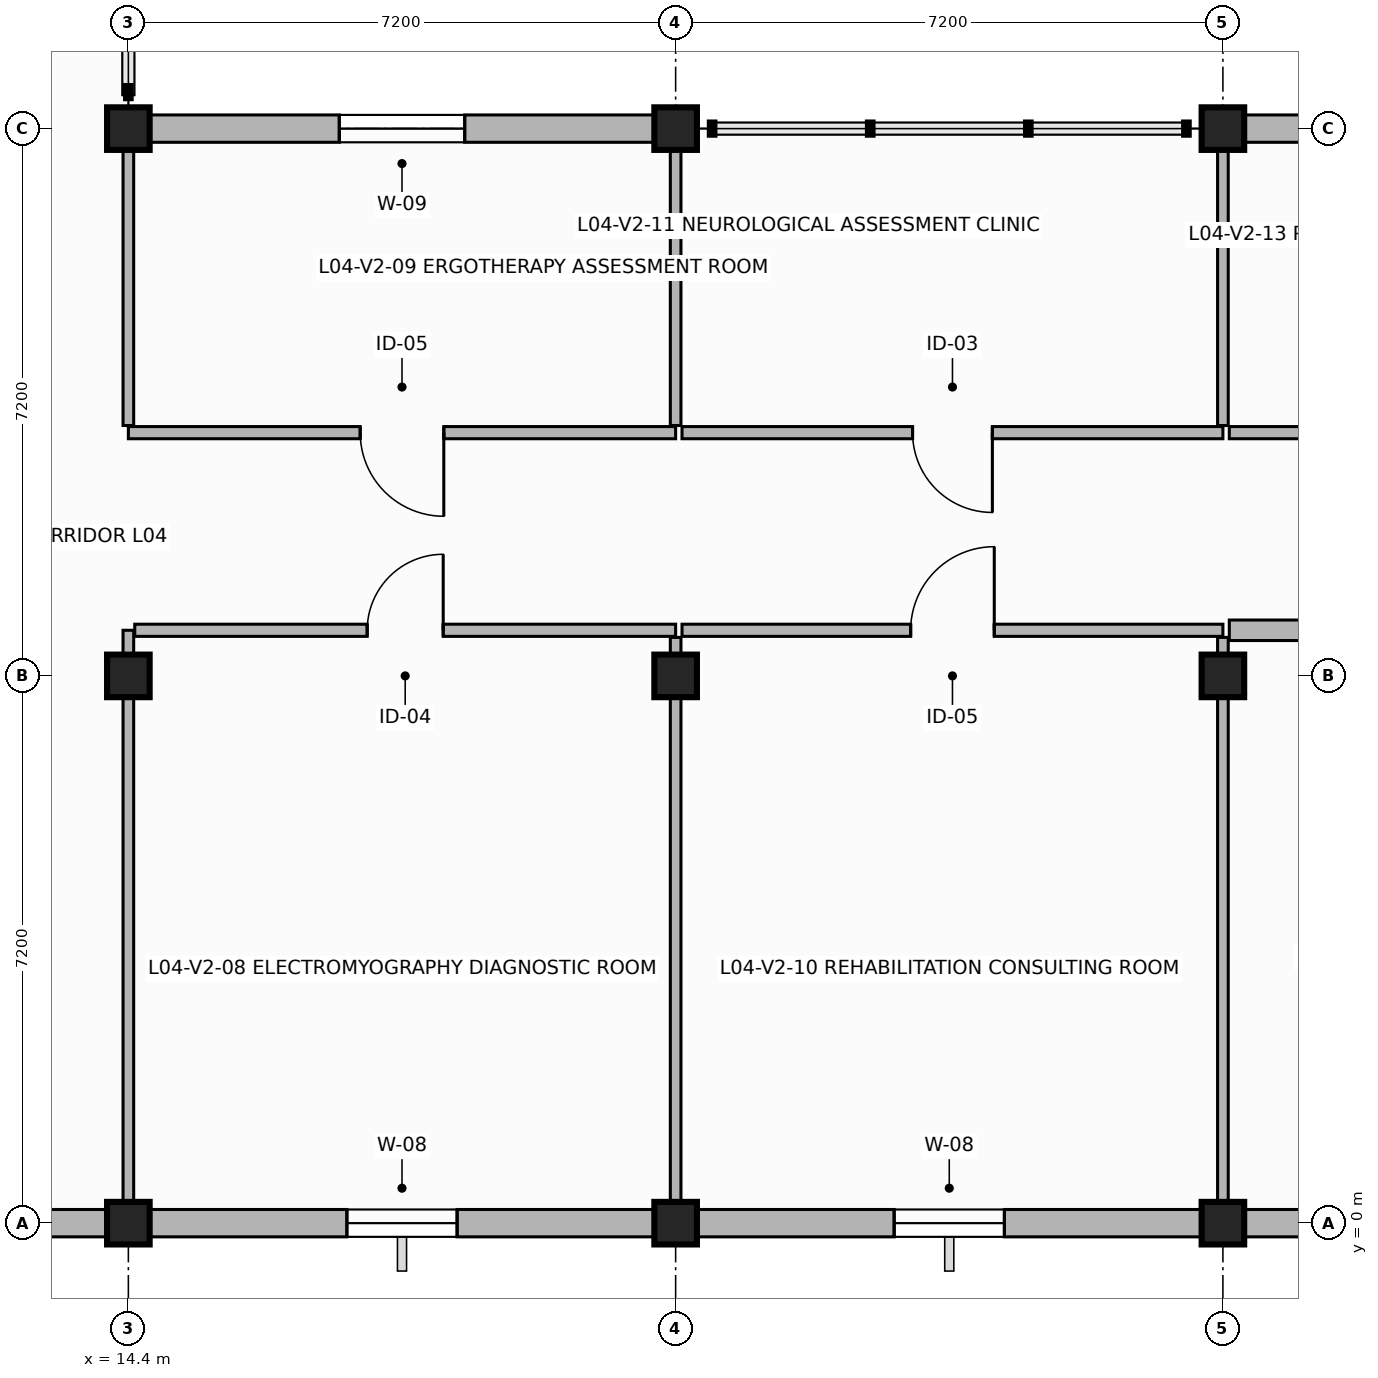
"""IFC4 building model, lengths in metres.
Left out: names, types, materials, properties, quantities, classifications, styles, units other than length and angle.
Written with IfcOpenShell. Run it as: python <this file> out.ifc"""

import sys

from ifc_helpers import new_model, si_unit, direction, frame, frame_2d, origin, origin_2d, place, context, subcontext, project, spatial, rectangle, extrude, element, fill, save


model = new_model("IFC4")
c1 = context("Model", 3, precision=1e-05, world=origin(), true_north=direction((0.0, 1.0)))
c2 = subcontext(c1, "Body", "Model", "MODEL_VIEW")
j1 = project(units=[si_unit("LENGTHUNIT", "METRE"), si_unit("PLANEANGLEUNIT", "RADIAN")], contexts=[c1])
p1 = place(None, origin())
s1 = spatial("IfcSite", under=j1, at=p1, CompositionType="ELEMENT")
p2 = place(p1, origin())
s2 = spatial("IfcBuilding", under=s1, at=p2, CompositionType="ELEMENT")
p3 = place(p2, frame((0.0, 0.0, 16.0)))
s3 = spatial("IfcBuildingStorey", under=s2, at=p3, CompositionType="ELEMENT", Elevation=16.0)
for number, where, z_axis, x_axis in (
    (1, (14.4, 0.0, 0.0), (0.0, 0.0, 1.0), (1.0, 0.0, 0.0)),
    (2, (14.4, 7.2, 0.0), (0.0, 0.0, 1.0), (1.0, 0.0, 0.0)),
    (3, (14.4, 14.4, 0.0), (0.0, 0.0, 1.0), (1.0, 0.0, 0.0)),
    (4, (21.6, 0.0, 0.0), (0.0, 0.0, 1.0), (1.0, 0.0, 0.0)),
    (5, (21.6, 7.2, 0.0), (0.0, 0.0, 1.0), (1.0, 0.0, 0.0)),
    (6, (21.6, 14.4, 0.0), (0.0, 0.0, 1.0), (1.0, 0.0, 0.0)),
    (7, (28.8, 0.0, 0.0), (0.0, 0.0, 1.0), (1.0, 0.0, 0.0)),
    (8, (28.8, 7.2, 0.0), (0.0, 0.0, 1.0), (1.0, 0.0, 0.0)),
    (9, (28.8, 14.4, 0.0), (0.0, 0.0, 1.0), (1.0, 0.0, 0.0)),
):
    element("IfcColumn", number, at=place(p3, frame(where, z_axis=z_axis, x_axis=x_axis)), inside=s3, PredefinedType="COLUMN", context=c2, shape_type="SweptSolid", body=[
        extrude(rectangle(XDim=0.56, YDim=0.56, at=origin_2d()), origin(), (0.0, 0.0, 1.0), 3.42),
    ])
p4 = place(p3, frame((7.2, 0.0, 0.0), z_axis=(0.0, 0.0, 1.0), x_axis=(1.0, 0.0, 0.0)))
e10 = element("IfcWall", 10, at=p4, inside=s3, PredefinedType="SOLIDWALL", context=c2, shape_type="SweptSolid", body=[
    extrude(rectangle(XDim=7.2, YDim=0.36, at=frame_2d((3.6, 0.0))), origin(), (0.0, 0.0, 1.0), 2.8),
])
p5 = place(p4, frame((2.875, 0.0, 0.85)))
e11 = element("IfcOpeningElement", 11, at=p5, cuts=e10, PredefinedType="OPENING", context=c2, shape_type="SweptSolid", body=[
    extrude(rectangle(XDim=1.45, YDim=1.75, at=frame_2d((0.725, 0.875))), frame((0.0, 0.19, 0.0), z_axis=(0.0, -1.0, 0.0), x_axis=(1.0, 0.0, 0.0)), (0.0, 0.0, 1.0), 0.38),
])
p6 = place(p3, frame((14.4, 0.0, 0.0), z_axis=(0.0, 0.0, 1.0), x_axis=(1.0, 0.0, 0.0)))
e12 = element("IfcWall", 12, at=p6, inside=s3, PredefinedType="SOLIDWALL", context=c2, shape_type="SweptSolid", body=[
    extrude(rectangle(XDim=7.2, YDim=0.36, at=frame_2d((3.6, 0.0))), origin(), (0.0, 0.0, 1.0), 2.8),
])
p7 = place(p6, frame((2.875, 0.0, 0.85)))
e13 = element("IfcOpeningElement", 13, at=p7, cuts=e12, PredefinedType="OPENING", context=c2, shape_type="SweptSolid", body=[
    extrude(rectangle(XDim=1.45, YDim=1.75, at=frame_2d((0.725, 0.875))), frame((0.0, 0.19, 0.0), z_axis=(0.0, -1.0, 0.0), x_axis=(1.0, 0.0, 0.0)), (0.0, 0.0, 1.0), 0.38),
])
p8 = place(p3, frame((21.6, 0.0, 0.0), z_axis=(0.0, 0.0, 1.0), x_axis=(1.0, 0.0, 0.0)))
e14 = element("IfcWall", 14, at=p8, inside=s3, PredefinedType="SOLIDWALL", context=c2, shape_type="SweptSolid", body=[
    extrude(rectangle(XDim=7.2, YDim=0.36, at=frame_2d((3.6, 0.0))), origin(), (0.0, 0.0, 1.0), 2.8),
])
p9 = place(p8, frame((2.875, 0.0, 0.85)))
e15 = element("IfcOpeningElement", 15, at=p9, cuts=e14, PredefinedType="OPENING", context=c2, shape_type="SweptSolid", body=[
    extrude(rectangle(XDim=1.45, YDim=1.75, at=frame_2d((0.725, 0.875))), frame((0.0, 0.19, 0.0), z_axis=(0.0, -1.0, 0.0), x_axis=(1.0, 0.0, 0.0)), (0.0, 0.0, 1.0), 0.38),
])
p10 = place(p3, frame((28.8, 0.0, 0.0), z_axis=(0.0, 0.0, 1.0), x_axis=(1.0, 0.0, 0.0)))
e16 = element("IfcWall", 16, at=p10, inside=s3, PredefinedType="SOLIDWALL", context=c2, shape_type="SweptSolid", body=[
    extrude(rectangle(XDim=4.8, YDim=0.36, at=frame_2d((2.4, 0.0))), origin(), (0.0, 0.0, 1.0), 2.8),
])
p11 = place(p10, frame((1.875, 0.0, 0.85)))
e17 = element("IfcOpeningElement", 17, at=p11, cuts=e16, PredefinedType="OPENING", context=c2, shape_type="SweptSolid", body=[
    extrude(rectangle(XDim=1.05, YDim=1.7, at=frame_2d((0.525, 0.85))), frame((0.0, 0.19, 0.0), z_axis=(0.0, -1.0, 0.0), x_axis=(1.0, 0.0, 0.0)), (0.0, 0.0, 1.0), 0.38),
])
p12 = place(p3, frame((33.6, 14.4, 0.0), z_axis=(0.0, 0.0, 1.0), x_axis=(-1.0, 0.0, 0.0)))
e18 = element("IfcWall", 18, at=p12, inside=s3, PredefinedType="SOLIDWALL", context=c2, shape_type="SweptSolid", body=[
    extrude(rectangle(XDim=4.8, YDim=0.36, at=frame_2d((2.4, 0.0))), origin(), (0.0, 0.0, 1.0), 2.8),
])
p13 = place(p12, frame((1.875, 0.0, 0.85)))
e19 = element("IfcOpeningElement", 19, at=p13, cuts=e18, PredefinedType="OPENING", context=c2, shape_type="SweptSolid", body=[
    extrude(rectangle(XDim=1.05, YDim=1.7, at=frame_2d((0.525, 0.85))), frame((0.0, 0.19, 0.0), z_axis=(0.0, -1.0, 0.0), x_axis=(1.0, 0.0, 0.0)), (0.0, 0.0, 1.0), 0.38),
])
p14 = place(p3, frame((21.6, 14.4, 0.0), z_axis=(0.0, 0.0, 1.0), x_axis=(-1.0, 0.0, 0.0)))
e20 = element("IfcWall", 20, at=p14, inside=s3, PredefinedType="SOLIDWALL", context=c2, shape_type="SweptSolid", body=[
    extrude(rectangle(XDim=7.2, YDim=0.36, at=frame_2d((3.6, 0.0))), origin(), (0.0, 0.0, 1.0), 2.8),
])
p15 = place(p14, frame((2.775, 0.0, 0.85)))
e21 = element("IfcOpeningElement", 21, at=p15, cuts=e20, PredefinedType="OPENING", context=c2, shape_type="SweptSolid", body=[
    extrude(rectangle(XDim=1.65, YDim=1.75, at=frame_2d((0.825, 0.875))), frame((0.0, 0.19, 0.0), z_axis=(0.0, -1.0, 0.0), x_axis=(1.0, 0.0, 0.0)), (0.0, 0.0, 1.0), 0.38),
])
p16 = place(p3, frame((14.4, 0.195, 0.0), z_axis=(0.0, 0.0, 1.0), x_axis=(0.0, 1.0, 0.0)))
e22 = element("IfcWall", 22, at=p16, inside=s3, PredefinedType="PARTITIONING", context=c2, shape_type="SweptSolid", body=[
    extrude(rectangle(XDim=7.605, YDim=0.14, at=frame_2d((3.802, 0.0))), origin(), (0.0, 0.0, 1.0), 2.78),
])
p17 = place(p3, frame((14.484, 7.8, 0.0), z_axis=(0.0, 0.0, 1.0), x_axis=(1.0, 0.0, 0.0)))
e23 = element("IfcWall", 23, at=p17, inside=s3, PredefinedType="PARTITIONING", context=c2, shape_type="SweptSolid", body=[
    extrude(rectangle(XDim=7.116, YDim=0.16, at=frame_2d((3.558, 0.0))), origin(), (0.0, 0.0, 1.0), 2.78),
])
p18 = place(p17, frame((3.058, 0.0, 0.0)))
e24 = element("IfcOpeningElement", 24, at=p18, cuts=e23, PredefinedType="OPENING", context=c2, shape_type="SweptSolid", body=[
    extrude(rectangle(XDim=1.0, YDim=2.15, at=frame_2d((0.5, 1.075))), frame((0.0, 0.09, 0.0), z_axis=(0.0, -1.0, 0.0), x_axis=(1.0, 0.0, 0.0)), (0.0, 0.0, 1.0), 0.18),
])
p19 = place(p3, frame((21.6, 7.706, 0.0), z_axis=(0.0, 0.0, 1.0), x_axis=(0.0, -1.0, 0.0)))
e25 = element("IfcWall", 25, at=p19, inside=s3, PredefinedType="PARTITIONING", context=c2, shape_type="SweptSolid", body=[
    extrude(rectangle(XDim=7.511, YDim=0.14, at=frame_2d((3.755, 0.0))), origin(), (0.0, 0.0, 1.0), 2.78),
])
p20 = place(p3, frame((21.6, 10.4, 0.0), z_axis=(0.0, 0.0, 1.0), x_axis=(-1.0, 0.0, 0.0)))
e26 = element("IfcWall", 26, at=p20, inside=s3, PredefinedType="PARTITIONING", context=c2, shape_type="SweptSolid", body=[
    extrude(rectangle(XDim=7.2, YDim=0.16, at=frame_2d((3.6, 0.0))), origin(), (0.0, 0.0, 1.0), 2.78),
])
p21 = place(p20, frame((3.05, 0.0, 0.0)))
e27 = element("IfcOpeningElement", 27, at=p21, cuts=e26, PredefinedType="OPENING", context=c2, shape_type="SweptSolid", body=[
    extrude(rectangle(XDim=1.1, YDim=2.2, at=frame_2d((0.55, 1.1))), frame((0.0, 0.09, 0.0), z_axis=(0.0, -1.0, 0.0), x_axis=(1.0, 0.0, 0.0)), (0.0, 0.0, 1.0), 0.18),
])
for number, where, z_axis, x_axis in (
    (28, (14.4, 10.494, 0.0), (0.0, 0.0, 1.0), (0.0, 1.0, 0.0)),
    (29, (21.6, 14.205, 0.0), (0.0, 0.0, 1.0), (0.0, -1.0, 0.0)),
):
    element("IfcWall", number, at=place(p3, frame(where, z_axis=z_axis, x_axis=x_axis)), inside=s3, PredefinedType="PARTITIONING", context=c2, shape_type="SweptSolid", body=[
        extrude(rectangle(XDim=3.711, YDim=0.14, at=frame_2d((1.855, 0.0))), origin(), (0.0, 0.0, 1.0), 2.78),
    ])
p22 = place(p3, frame((21.684, 7.8, 0.0), z_axis=(0.0, 0.0, 1.0), x_axis=(1.0, 0.0, 0.0)))
e30 = element("IfcWall", 30, at=p22, inside=s3, PredefinedType="PARTITIONING", context=c2, shape_type="SweptSolid", body=[
    extrude(rectangle(XDim=7.116, YDim=0.16, at=frame_2d((3.558, 0.0))), origin(), (0.0, 0.0, 1.0), 2.78),
])
p23 = place(p22, frame((3.008, 0.0, 0.0)))
e31 = element("IfcOpeningElement", 31, at=p23, cuts=e30, PredefinedType="OPENING", context=c2, shape_type="SweptSolid", body=[
    extrude(rectangle(XDim=1.1, YDim=2.2, at=frame_2d((0.55, 1.1))), frame((0.0, 0.09, 0.0), z_axis=(0.0, -1.0, 0.0), x_axis=(1.0, 0.0, 0.0)), (0.0, 0.0, 1.0), 0.18),
])
p24 = place(p3, frame((28.8, 7.706, 0.0), z_axis=(0.0, 0.0, 1.0), x_axis=(0.0, -1.0, 0.0)))
e32 = element("IfcWall", 32, at=p24, inside=s3, PredefinedType="PARTITIONING", context=c2, shape_type="SweptSolid", body=[
    extrude(rectangle(XDim=7.511, YDim=0.14, at=frame_2d((3.755, 0.0))), origin(), (0.0, 0.0, 1.0), 2.78),
])
p25 = place(p3, frame((28.8, 10.4, 0.0), z_axis=(0.0, 0.0, 1.0), x_axis=(-1.0, 0.0, 0.0)))
e33 = element("IfcWall", 33, at=p25, inside=s3, PredefinedType="PARTITIONING", context=c2, shape_type="SweptSolid", body=[
    extrude(rectangle(XDim=7.116, YDim=0.16, at=frame_2d((3.558, 0.0))), origin(), (0.0, 0.0, 1.0), 2.78),
])
p26 = place(p25, frame((3.033, 0.0, 0.0)))
e34 = element("IfcOpeningElement", 34, at=p26, cuts=e33, PredefinedType="OPENING", context=c2, shape_type="SweptSolid", body=[
    extrude(rectangle(XDim=1.05, YDim=2.15, at=frame_2d((0.525, 1.075))), frame((0.0, 0.09, 0.0), z_axis=(0.0, -1.0, 0.0), x_axis=(1.0, 0.0, 0.0)), (0.0, 0.0, 1.0), 0.18),
])
p27 = place(p3, frame((28.8, 14.205, 0.0), z_axis=(0.0, 0.0, 1.0), x_axis=(0.0, -1.0, 0.0)))
e35 = element("IfcWall", 35, at=p27, inside=s3, PredefinedType="PARTITIONING", context=c2, shape_type="SweptSolid", body=[
    extrude(rectangle(XDim=3.711, YDim=0.14, at=frame_2d((1.855, 0.0))), origin(), (0.0, 0.0, 1.0), 2.78),
])
p28 = place(p3, frame((28.884, 7.8, 0.0), z_axis=(0.0, 0.0, 1.0), x_axis=(1.0, 0.0, 0.0)))
e36 = element("IfcWall", 36, at=p28, inside=s3, PredefinedType="PARTITIONING", context=c2, shape_type="SweptSolid", body=[
    extrude(rectangle(XDim=4.716, YDim=0.27, at=frame_2d((2.358, 0.0))), origin(), (0.0, 0.0, 1.0), 2.78),
])
p29 = place(p28, frame((1.858, 0.0, 0.0)))
e37 = element("IfcOpeningElement", 37, at=p29, cuts=e36, PredefinedType="OPENING", context=c2, shape_type="SweptSolid", body=[
    extrude(rectangle(XDim=1.0, YDim=2.15, at=frame_2d((0.5, 1.075))), frame((0.0, 0.145, 0.0), z_axis=(0.0, -1.0, 0.0), x_axis=(1.0, 0.0, 0.0)), (0.0, 0.0, 1.0), 0.29),
])
p30 = place(p3, frame((33.6, 10.4, 0.0), z_axis=(0.0, 0.0, 1.0), x_axis=(-1.0, 0.0, 0.0)))
e38 = element("IfcWall", 38, at=p30, inside=s3, PredefinedType="PARTITIONING", context=c2, shape_type="SweptSolid", body=[
    extrude(rectangle(XDim=4.716, YDim=0.16, at=frame_2d((2.358, 0.0))), origin(), (0.0, 0.0, 1.0), 2.78),
])
p31 = place(p30, frame((1.858, 0.0, 0.0)))
e39 = element("IfcOpeningElement", 39, at=p31, cuts=e38, PredefinedType="OPENING", context=c2, shape_type="SweptSolid", body=[
    extrude(rectangle(XDim=1.0, YDim=2.15, at=frame_2d((0.5, 1.075))), frame((0.0, 0.09, 0.0), z_axis=(0.0, -1.0, 0.0), x_axis=(1.0, 0.0, 0.0)), (0.0, 0.0, 1.0), 0.18),
])
p32 = place(p7, origin())
e40 = element("IfcWindow", 40, at=p32, inside=s3, PartitioningType="SINGLE_PANEL", PredefinedType="WINDOW", context=c2, shape_type="SweptSolid", body=[
    extrude(rectangle(XDim=1.45, YDim=1.75, at=frame_2d((0.725, 0.875))), frame((0.0, 0.03, 0.0), z_axis=(0.0, -1.0, 0.0), x_axis=(1.0, 0.0, 0.0)), (0.0, 0.0, 1.0), 0.06),
])
fill(e13, e40)
p33 = place(p9, origin())
e41 = element("IfcWindow", 41, at=p33, inside=s3, PartitioningType="SINGLE_PANEL", PredefinedType="WINDOW", context=c2, shape_type="SweptSolid", body=[
    extrude(rectangle(XDim=1.45, YDim=1.75, at=frame_2d((0.725, 0.875))), frame((0.0, 0.03, 0.0), z_axis=(0.0, -1.0, 0.0), x_axis=(1.0, 0.0, 0.0)), (0.0, 0.0, 1.0), 0.06),
])
fill(e15, e41)
p34 = place(p15, origin())
e42 = element("IfcWindow", 42, at=p34, inside=s3, PartitioningType="SINGLE_PANEL", PredefinedType="WINDOW", context=c2, shape_type="SweptSolid", body=[
    extrude(rectangle(XDim=1.65, YDim=1.75, at=frame_2d((0.825, 0.875))), frame((0.0, 0.03, 0.0), z_axis=(0.0, -1.0, 0.0), x_axis=(1.0, 0.0, 0.0)), (0.0, 0.0, 1.0), 0.06),
])
fill(e21, e42)
p35 = place(p18, origin())
e43 = element("IfcDoor", 43, at=p35, inside=s3, OperationType="SINGLE_SWING_RIGHT", PredefinedType="DOOR", context=c2, shape_type="SweptSolid", body=[
    extrude(rectangle(XDim=1.0, YDim=2.15, at=frame_2d((0.5, 1.075))), frame((0.0, 0.025, 0.0), z_axis=(0.0, -1.0, 0.0), x_axis=(1.0, 0.0, 0.0)), (0.0, 0.0, 1.0), 0.05),
])
fill(e24, e43)
p36 = place(p21, origin())
e44 = element("IfcDoor", 44, at=p36, inside=s3, OperationType="SINGLE_SWING_LEFT", PredefinedType="DOOR", context=c2, shape_type="SweptSolid", body=[
    extrude(rectangle(XDim=1.1, YDim=2.2, at=frame_2d((0.55, 1.1))), frame((0.0, 0.025, 0.0), z_axis=(0.0, -1.0, 0.0), x_axis=(1.0, 0.0, 0.0)), (0.0, 0.0, 1.0), 0.05),
])
fill(e27, e44)
p37 = place(p23, origin())
e45 = element("IfcDoor", 45, at=p37, inside=s3, OperationType="SINGLE_SWING_RIGHT", PredefinedType="DOOR", context=c2, shape_type="SweptSolid", body=[
    extrude(rectangle(XDim=1.1, YDim=2.2, at=frame_2d((0.55, 1.1))), frame((0.0, 0.025, 0.0), z_axis=(0.0, -1.0, 0.0), x_axis=(1.0, 0.0, 0.0)), (0.0, 0.0, 1.0), 0.05),
])
fill(e31, e45)
p38 = place(p26, origin())
e46 = element("IfcDoor", 46, at=p38, inside=s3, OperationType="SINGLE_SWING_LEFT", PredefinedType="DOOR", context=c2, shape_type="SweptSolid", body=[
    extrude(rectangle(XDim=1.05, YDim=2.15, at=frame_2d((0.525, 1.075))), frame((0.0, 0.025, 0.0), z_axis=(0.0, -1.0, 0.0), x_axis=(1.0, 0.0, 0.0)), (0.0, 0.0, 1.0), 0.05),
])
fill(e34, e46)
save(model, sys.argv[1])
